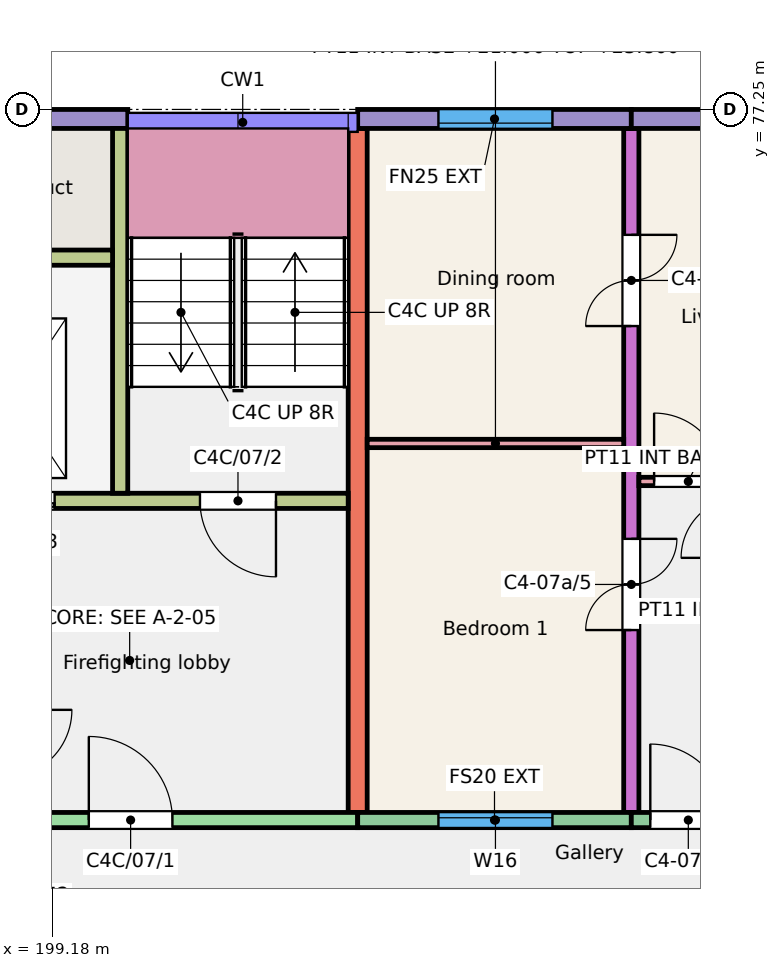
"""IFC4 building model, lengths in metres.
Left out: names, types, materials, properties, quantities, classifications, styles, units other than length and angle.
Written with IfcOpenShell. Run it as: python <this file> out.ifc"""

import sys

from ifc_helpers import new_model, si_unit, direction, frame, frame_2d, origin, place, context, subcontext, project, spatial, rectangle, extrude, element, fill, save


model = new_model("IFC4")
c1 = context("Model", 3, precision=1e-05, world=origin(), true_north=direction((0.0, 1.0)))
c2 = subcontext(c1, "Body", "Model", "MODEL_VIEW")
j1 = project(units=[si_unit("LENGTHUNIT", "METRE"), si_unit("PLANEANGLEUNIT", "RADIAN")], contexts=[c1])
p1 = place(None, origin())
s1 = spatial("IfcSite", under=j1, at=p1, CompositionType="ELEMENT")
p2 = place(p1, origin())
s2 = spatial("IfcBuilding", under=s1, at=p2, CompositionType="ELEMENT")
p3 = place(p2, frame((0.0, 0.0, 21.0)))
s3 = spatial("IfcBuildingStorey", under=s2, at=p3, CompositionType="ELEMENT", Elevation=21.0)
p4 = place(p3, frame((203.2, 68.0, 0.0), z_axis=(0.0, 0.0, 1.0), x_axis=(0.0, 1.0, 0.0)))
e1 = element("IfcWall", 1, at=p4, inside=s3, PredefinedType="SHEAR", context=c2, shape_type="SweptSolid", body=[
    extrude(rectangle(XDim=9.0, YDim=0.25, at=frame_2d((4.5, 0.0))), origin(), (0.0, 0.0, 1.0), 3.0),
])
p5 = place(p3, frame((206.8, 68.0, 0.0), z_axis=(0.0, 0.0, 1.0), x_axis=(0.0, 1.0, 0.0)))
e2 = element("IfcWall", 2, at=p5, inside=s3, PredefinedType="SHEAR", context=c2, shape_type="SweptSolid", body=[
    extrude(rectangle(XDim=9.0, YDim=0.2, at=frame_2d((4.5, 0.0))), origin(), (0.0, 0.0, 1.0), 3.0),
])
p6 = place(p5, frame((2.4, 0.0, 0.0)))
e3 = element("IfcOpeningElement", 3, at=p6, cuts=e2, PredefinedType="OPENING", context=c2, shape_type="SweptSolid", body=[
    extrude(rectangle(XDim=1.2, YDim=2.1, at=frame_2d((0.6, 1.05))), frame((0.0, 0.11, 0.0), z_axis=(0.0, -1.0, 0.0), x_axis=(1.0, 0.0, 0.0)), (0.0, 0.0, 1.0), 0.22),
])
p7 = place(p5, frame((6.4, 0.0, 0.0)))
e4 = element("IfcOpeningElement", 4, at=p7, cuts=e2, PredefinedType="OPENING", context=c2, shape_type="SweptSolid", body=[
    extrude(rectangle(XDim=1.2, YDim=2.1, at=frame_2d((0.6, 1.05))), frame((0.0, 0.11, 0.0), z_axis=(0.0, -1.0, 0.0), x_axis=(1.0, 0.0, 0.0)), (0.0, 0.0, 1.0), 0.22),
])
p8 = place(p3, frame((197.2, 77.125, 0.0), z_axis=(0.0, 0.0, 1.0), x_axis=(1.0, 0.0, 0.0)))
e5 = element("IfcWall", 5, at=p8, inside=s3, PredefinedType="SOLIDWALL", context=c2, shape_type="SweptSolid", body=[
    extrude(rectangle(XDim=2.975, YDim=0.25, at=frame_2d((1.488, 0.0))), origin(), (0.0, 0.0, 1.0), 3.0),
])
p9 = place(p3, frame((197.35, 67.9, 0.0), z_axis=(0.0, 0.0, 1.0), x_axis=(1.0, 0.0, 0.0)))
e6 = element("IfcWall", 6, at=p9, inside=s3, PredefinedType="SHEAR", context=c2, shape_type="SweptSolid", body=[
    extrude(rectangle(XDim=5.85, YDim=0.2, at=frame_2d((2.925, 0.0))), origin(), (0.0, 0.0, 1.0), 3.0),
])
p10 = place(p9, frame((2.312, 0.0, 0.0)))
e7 = element("IfcOpeningElement", 7, at=p10, cuts=e6, PredefinedType="OPENING", context=c2, shape_type="SweptSolid", body=[
    extrude(rectangle(XDim=1.1, YDim=2.1, at=frame_2d((0.55, 1.05))), frame((0.0, 0.11, 0.0), z_axis=(0.0, -1.0, 0.0), x_axis=(1.0, 0.0, 0.0)), (0.0, 0.0, 1.0), 0.22),
])
p11 = place(p3, frame((197.35, 72.1, 0.0), z_axis=(0.0, 0.0, 1.0), x_axis=(1.0, 0.0, 0.0)))
e8 = element("IfcWall", 8, at=p11, inside=s3, PredefinedType="SHEAR", context=c2, shape_type="SweptSolid", body=[
    extrude(rectangle(XDim=5.725, YDim=0.2, at=frame_2d((2.862, 0.0))), origin(), (0.0, 0.0, 1.0), 3.0),
])
p12 = place(p11, frame((3.775, 0.0, 0.0)))
e9 = element("IfcOpeningElement", 9, at=p12, cuts=e8, PredefinedType="OPENING", context=c2, shape_type="SweptSolid", body=[
    extrude(rectangle(XDim=1.0, YDim=2.1, at=frame_2d((0.5, 1.05))), frame((0.0, 0.11, 0.0), z_axis=(0.0, -1.0, 0.0), x_axis=(1.0, 0.0, 0.0)), (0.0, 0.0, 1.0), 0.22),
])
p13 = place(p11, frame((0.762, 0.0, 0.0)))
e10 = element("IfcOpeningElement", 10, at=p13, cuts=e8, PredefinedType="OPENING", context=c2, shape_type="SweptSolid", body=[
    extrude(rectangle(XDim=1.1, YDim=2.1, at=frame_2d((0.55, 1.05))), frame((0.0, 0.11, 0.0), z_axis=(0.0, -1.0, 0.0), x_axis=(1.0, 0.0, 0.0)), (0.0, 0.0, 1.0), 0.22),
])
p14 = place(p3, frame((200.075, 72.2, 0.0), z_axis=(0.0, 0.0, 1.0), x_axis=(0.0, 1.0, 0.0)))
e11 = element("IfcWall", 11, at=p14, inside=s3, PredefinedType="SHEAR", context=c2, shape_type="SweptSolid", body=[
    extrude(rectangle(XDim=4.8, YDim=0.2, at=frame_2d((2.4, 0.0))), origin(), (0.0, 0.0, 1.0), 3.0),
])
p15 = place(p3, frame((197.35, 75.3, 0.0), z_axis=(0.0, 0.0, 1.0), x_axis=(1.0, 0.0, 0.0)))
e12 = element("IfcWall", 12, at=p15, inside=s3, PredefinedType="SHEAR", context=c2, shape_type="SweptSolid", body=[
    extrude(rectangle(XDim=2.625, YDim=0.2, at=frame_2d((1.312, 0.0))), origin(), (0.0, 0.0, 1.0), 3.0),
])
p16 = place(p3, frame((203.2, 77.125, 0.0), z_axis=(0.0, 0.0, 1.0), x_axis=(1.0, 0.0, 0.0)))
e13 = element("IfcWall", 13, at=p16, inside=s3, PredefinedType="SOLIDWALL", context=c2, shape_type="SweptSolid", body=[
    extrude(rectangle(XDim=3.6, YDim=0.25, at=frame_2d((1.8, 0.0))), origin(), (0.0, 0.0, 1.0), 3.0),
])
p17 = place(p16, frame((1.062, 0.0, 0.9)))
e14 = element("IfcOpeningElement", 14, at=p17, cuts=e13, PredefinedType="OPENING", context=c2, shape_type="SweptSolid", body=[
    extrude(rectangle(XDim=1.5, YDim=1.5, at=frame_2d((0.75, 0.75))), frame((0.0, 0.135, 0.0), z_axis=(0.0, -1.0, 0.0), x_axis=(1.0, 0.0, 0.0)), (0.0, 0.0, 1.0), 0.27),
])
p18 = place(p3, frame((203.2, 67.9, 0.0), z_axis=(0.0, 0.0, 1.0), x_axis=(1.0, 0.0, 0.0)))
e15 = element("IfcWall", 15, at=p18, inside=s3, PredefinedType="SOLIDWALL", context=c2, shape_type="SweptSolid", body=[
    extrude(rectangle(XDim=3.6, YDim=0.2, at=frame_2d((1.8, 0.0))), origin(), (0.0, 0.0, 1.0), 3.0),
])
p19 = place(p18, frame((1.062, 0.0, 0.9)))
e16 = element("IfcOpeningElement", 16, at=p19, cuts=e15, PredefinedType="OPENING", context=c2, shape_type="SweptSolid", body=[
    extrude(rectangle(XDim=1.5, YDim=1.5, at=frame_2d((0.75, 0.75))), frame((0.0, 0.11, 0.0), z_axis=(0.0, -1.0, 0.0), x_axis=(1.0, 0.0, 0.0)), (0.0, 0.0, 1.0), 0.22),
])
p20 = place(p3, frame((206.8, 77.125, 0.0), z_axis=(0.0, 0.0, 1.0), x_axis=(1.0, 0.0, 0.0)))
e17 = element("IfcWall", 17, at=p20, inside=s3, PredefinedType="SOLIDWALL", context=c2, shape_type="SweptSolid", body=[
    extrude(rectangle(XDim=3.6, YDim=0.25, at=frame_2d((1.8, 0.0))), origin(), (0.0, 0.0, 1.0), 3.0),
])
p21 = place(p20, frame((1.05, 0.0, 0.9)))
e18 = element("IfcOpeningElement", 18, at=p21, cuts=e17, PredefinedType="OPENING", context=c2, shape_type="SweptSolid", body=[
    extrude(rectangle(XDim=1.5, YDim=1.5, at=frame_2d((0.75, 0.75))), frame((0.0, 0.135, 0.0), z_axis=(0.0, -1.0, 0.0), x_axis=(1.0, 0.0, 0.0)), (0.0, 0.0, 1.0), 0.27),
])
p22 = place(p3, frame((206.8, 67.9, 0.0), z_axis=(0.0, 0.0, 1.0), x_axis=(1.0, 0.0, 0.0)))
e19 = element("IfcWall", 19, at=p22, inside=s3, PredefinedType="SOLIDWALL", context=c2, shape_type="SweptSolid", body=[
    extrude(rectangle(XDim=3.6, YDim=0.2, at=frame_2d((1.8, 0.0))), origin(), (0.0, 0.0, 1.0), 3.0),
])
p23 = place(p22, frame((1.905, 0.0, 1.1)))
e20 = element("IfcOpeningElement", 20, at=p23, cuts=e19, PredefinedType="OPENING", context=c2, shape_type="SweptSolid", body=[
    extrude(rectangle(XDim=1.2, YDim=1.3, at=frame_2d((0.6, 0.65))), frame((0.0, 0.11, 0.0), z_axis=(0.0, -1.0, 0.0), x_axis=(1.0, 0.0, 0.0)), (0.0, 0.0, 1.0), 0.22),
])
p24 = place(p22, frame((0.25, 0.0, 0.0)))
e21 = element("IfcOpeningElement", 21, at=p24, cuts=e19, PredefinedType="OPENING", context=c2, shape_type="SweptSolid", body=[
    extrude(rectangle(XDim=1.0, YDim=2.1, at=frame_2d((0.5, 1.05))), frame((0.0, 0.11, 0.0), z_axis=(0.0, -1.0, 0.0), x_axis=(1.0, 0.0, 0.0)), (0.0, 0.0, 1.0), 0.22),
])
p25 = place(p3, frame((206.9, 72.355, 0.0), z_axis=(0.0, 0.0, 1.0), x_axis=(1.0, 0.0, 0.0)))
e22 = element("IfcWall", 22, at=p25, inside=s3, PredefinedType="PARTITIONING", context=c2, shape_type="SweptSolid", body=[
    extrude(rectangle(XDim=3.4, YDim=0.11, at=frame_2d((1.7, 0.0))), origin(), (0.0, 0.0, 1.0), 2.75),
])
p26 = place(p25, frame((0.2, 0.0, 0.0)))
e23 = element("IfcOpeningElement", 23, at=p26, cuts=e22, PredefinedType="OPENING", context=c2, shape_type="SweptSolid", body=[
    extrude(rectangle(XDim=0.9, YDim=2.1, at=frame_2d((0.45, 1.05))), frame((0.0, 0.065, 0.0), z_axis=(0.0, -1.0, 0.0), x_axis=(1.0, 0.0, 0.0)), (0.0, 0.0, 1.0), 0.13),
])
p27 = place(p3, frame((203.325, 72.855, 0.0), z_axis=(0.0, 0.0, 1.0), x_axis=(1.0, 0.0, 0.0)))
e24 = element("IfcWall", 24, at=p27, inside=s3, PredefinedType="PARTITIONING", context=c2, shape_type="SweptSolid", body=[
    extrude(rectangle(XDim=3.375, YDim=0.11, at=frame_2d((1.688, 0.0))), origin(), (0.0, 0.0, 1.0), 2.8),
])
p28 = place(p19, origin())
e25 = element("IfcWindow", 25, at=p28, inside=s3, PartitioningType="SINGLE_PANEL", PredefinedType="WINDOW", context=c2, shape_type="SweptSolid", body=[
    extrude(rectangle(XDim=1.5, YDim=1.5, at=frame_2d((0.75, 0.75))), frame((0.0, 0.06, 0.0), z_axis=(0.0, -1.0, 0.0), x_axis=(1.0, 0.0, 0.0)), (0.0, 0.0, 1.0), 0.06),
])
fill(e16, e25)
p29 = place(p17, origin())
e26 = element("IfcWindow", 26, at=p29, inside=s3, PartitioningType="SINGLE_PANEL", PredefinedType="WINDOW", context=c2, shape_type="SweptSolid", body=[
    extrude(rectangle(XDim=1.5, YDim=1.5, at=frame_2d((0.75, 0.75))), frame((0.0, -0.025, 0.0), z_axis=(0.0, -1.0, 0.0), x_axis=(1.0, 0.0, 0.0)), (0.0, 0.0, 1.0), 0.06),
])
fill(e14, e26)
p30 = place(p24, origin())
e27 = element("IfcDoor", 27, at=p30, inside=s3, OperationType="SINGLE_SWING_LEFT", PredefinedType="DOOR", context=c2, shape_type="SweptSolid", body=[
    extrude(rectangle(XDim=1.0, YDim=2.1, at=frame_2d((0.5, 1.05))), frame((0.0, 0.025, 0.0), z_axis=(0.0, -1.0, 0.0), x_axis=(1.0, 0.0, 0.0)), (0.0, 0.0, 1.0), 0.05),
])
fill(e21, e27)
p31 = place(p26, origin())
e28 = element("IfcDoor", 28, at=p31, inside=s3, OperationType="SINGLE_SWING_LEFT", PredefinedType="DOOR", context=c2, shape_type="SweptSolid", body=[
    extrude(rectangle(XDim=0.9, YDim=2.1, at=frame_2d((0.45, 1.05))), frame((0.0, 0.025, 0.0), z_axis=(0.0, -1.0, 0.0), x_axis=(1.0, 0.0, 0.0)), (0.0, 0.0, 1.0), 0.05),
])
fill(e23, e28)
p32 = place(p6, origin())
e29 = element("IfcDoor", 29, at=p32, inside=s3, OperationType="DOUBLE_DOOR_SINGLE_SWING", PredefinedType="DOOR", context=c2, shape_type="SweptSolid", body=[
    extrude(rectangle(XDim=1.2, YDim=2.1, at=frame_2d((0.6, 1.05))), frame((0.0, 0.025, 0.0), z_axis=(0.0, -1.0, 0.0), x_axis=(1.0, 0.0, 0.0)), (0.0, 0.0, 1.0), 0.05),
])
fill(e3, e29)
p33 = place(p7, origin())
e30 = element("IfcDoor", 30, at=p33, inside=s3, OperationType="DOUBLE_DOOR_SINGLE_SWING", PredefinedType="DOOR", context=c2, shape_type="SweptSolid", body=[
    extrude(rectangle(XDim=1.2, YDim=2.1, at=frame_2d((0.6, 1.05))), frame((0.0, 0.025, 0.0), z_axis=(0.0, -1.0, 0.0), x_axis=(1.0, 0.0, 0.0)), (0.0, 0.0, 1.0), 0.05),
])
fill(e4, e30)
p34 = place(p10, origin())
e31 = element("IfcDoor", 31, at=p34, inside=s3, OperationType="SINGLE_SWING_LEFT", PredefinedType="DOOR", context=c2, shape_type="SweptSolid", body=[
    extrude(rectangle(XDim=1.1, YDim=2.1, at=frame_2d((0.55, 1.05))), frame((0.0, 0.025, 0.0), z_axis=(0.0, -1.0, 0.0), x_axis=(1.0, 0.0, 0.0)), (0.0, 0.0, 1.0), 0.05),
])
fill(e7, e31)
p35 = place(p12, origin())
e32 = element("IfcDoor", 32, at=p35, inside=s3, OperationType="SINGLE_SWING_RIGHT", PredefinedType="DOOR", context=c2, shape_type="SweptSolid", body=[
    extrude(rectangle(XDim=1.0, YDim=2.1, at=frame_2d((0.5, 1.05))), frame((0.0, 0.025, 0.0), z_axis=(0.0, -1.0, 0.0), x_axis=(1.0, 0.0, 0.0)), (0.0, 0.0, 1.0), 0.05),
])
fill(e9, e32)
p36 = place(p13, origin())
e33 = element("IfcDoor", 33, at=p36, inside=s3, OperationType="DOUBLE_DOOR_SLIDING", PredefinedType="DOOR", context=c2, shape_type="SweptSolid", body=[
    extrude(rectangle(XDim=1.1, YDim=2.1, at=frame_2d((0.55, 1.05))), frame((0.0, 0.025, 0.0), z_axis=(0.0, -1.0, 0.0), x_axis=(1.0, 0.0, 0.0)), (0.0, 0.0, 1.0), 0.05),
])
fill(e10, e33)
save(model, sys.argv[1])
